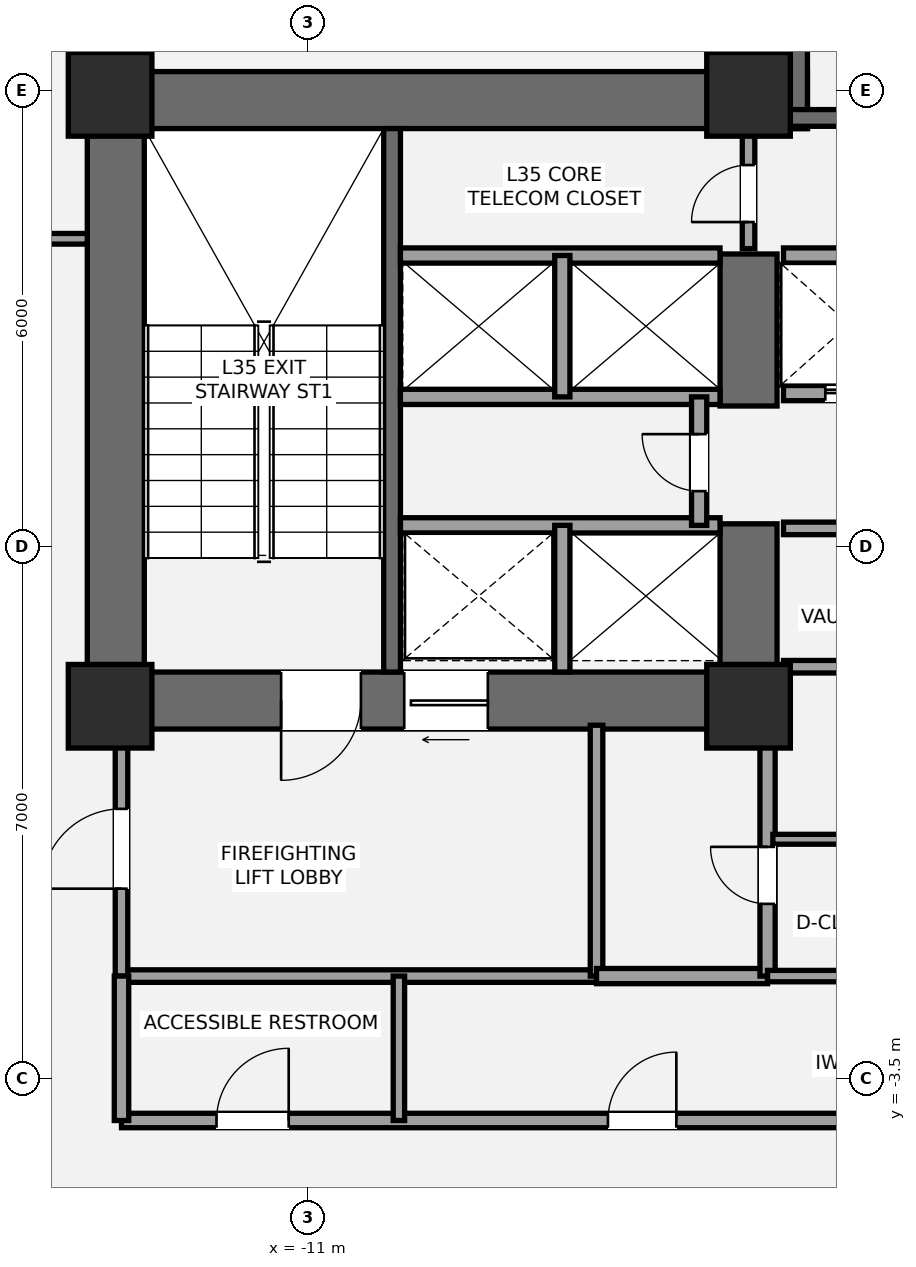
"""IFC4 building model, lengths in metres.
Left out: names, types, materials, properties, quantities, classifications, styles, units other than length and angle.
Written with IfcOpenShell. Run it as: python <this file> out.ifc"""

import sys

from ifc_helpers import new_model, si_unit, direction, frame, frame_2d, origin, origin_2d, place, context, subcontext, project, spatial, rectangle, extrude, element, fill, save


model = new_model("IFC4")
c1 = context("Model", 3, precision=1e-05, world=origin(), true_north=direction((0.0, 1.0)))
c2 = subcontext(c1, "Body", "Model", "MODEL_VIEW")
j1 = project(units=[si_unit("LENGTHUNIT", "METRE"), si_unit("PLANEANGLEUNIT", "RADIAN")], contexts=[c1])
p1 = place(None, origin())
s1 = spatial("IfcSite", under=j1, at=p1, CompositionType="ELEMENT")
p2 = place(p1, origin())
s2 = spatial("IfcBuilding", under=s1, at=p2, CompositionType="ELEMENT")
p3 = place(p2, frame((0.0, 0.0, 131.6)))
s3 = spatial("IfcBuildingStorey", under=s2, at=p3, CompositionType="ELEMENT", Elevation=131.6)
p4 = place(p3, frame((-13.525, 1.1, 0.0), z_axis=(0.0, 0.0, 1.0), x_axis=(0.0, 1.0, 0.0)))
e1 = element("IfcWall", 1, at=p4, inside=s3, PredefinedType="SHEAR", context=c2, shape_type="SweptSolid", body=[
    extrude(rectangle(XDim=8.65, YDim=0.75, at=frame_2d((4.325, 0.0))), origin(), (0.0, 0.0, 1.0), 3.5),
])
p5 = place(p3, frame((-13.9, 9.375, 0.0), z_axis=(0.0, 0.0, 1.0), x_axis=(1.0, 0.0, 0.0)))
e2 = element("IfcWall", 2, at=p5, inside=s3, PredefinedType="SHEAR", context=c2, shape_type="SweptSolid", body=[
    extrude(rectangle(XDim=9.475, YDim=0.75, at=frame_2d((4.737, 0.0))), origin(), (0.0, 0.0, 1.0), 3.5),
])
p6 = place(p3, frame((-4.825, 1.475, 0.0), z_axis=(0.0, 0.0, 1.0), x_axis=(-1.0, 0.0, 0.0)))
e3 = element("IfcWall", 3, at=p6, inside=s3, PredefinedType="SHEAR", context=c2, shape_type="SweptSolid", body=[
    extrude(rectangle(XDim=9.075, YDim=0.75, at=frame_2d((4.538, 0.0))), origin(), (0.0, 0.0, 1.0), 3.5),
])
p7 = place(p6, frame((5.475, 0.0, 0.0)))
e4 = element("IfcOpeningElement", 4, at=p7, cuts=e3, PredefinedType="OPENING", context=c2, shape_type="SweptSolid", body=[
    extrude(rectangle(XDim=1.05, YDim=2.15, at=frame_2d((0.525, 1.075))), frame((0.0, 0.385, 0.0), z_axis=(0.0, -1.0, 0.0), x_axis=(1.0, 0.0, 0.0)), (0.0, 0.0, 1.0), 0.77),
])
p8 = place(p6, frame((3.805, 0.0, 0.0)))
e5 = element("IfcOpeningElement", 5, at=p8, cuts=e3, PredefinedType="OPENING", context=c2, shape_type="SweptSolid", body=[
    extrude(rectangle(XDim=1.1, YDim=2.2, at=frame_2d((0.55, 1.1))), frame((0.0, 0.385, 0.0), z_axis=(0.0, -1.0, 0.0), x_axis=(1.0, 0.0, 0.0)), (0.0, 0.0, 1.0), 0.77),
])
p9 = place(p3, frame((-5.2, 1.1, 0.0), z_axis=(0.0, 0.0, 1.0), x_axis=(0.0, 1.0, 0.0)))
e6 = element("IfcWall", 6, at=p9, inside=s3, PredefinedType="SHEAR", context=c2, shape_type="SweptSolid", body=[
    extrude(rectangle(XDim=2.7, YDim=0.75, at=frame_2d((1.35, 0.0))), origin(), (0.0, 0.0, 1.0), 3.5),
])
p10 = place(p3, frame((-5.2, 5.35, 0.0), z_axis=(0.0, 0.0, 1.0), x_axis=(0.0, 1.0, 0.0)))
e7 = element("IfcWall", 7, at=p10, inside=s3, PredefinedType="SHEAR", context=c2, shape_type="SweptSolid", body=[
    extrude(rectangle(XDim=2.0, YDim=0.75, at=frame_2d((1.0, 0.0))), origin(), (0.0, 0.0, 1.0), 3.5),
])
p11 = place(p3, frame((-9.89, 1.85, 0.0), z_axis=(0.0, 0.0, 1.0), x_axis=(0.0, 1.0, 0.0)))
e8 = element("IfcWall", 8, at=p11, inside=s3, PredefinedType="SHEAR", context=c2, shape_type="SweptSolid", body=[
    extrude(rectangle(XDim=7.15, YDim=0.22, at=frame_2d((3.575, 0.0))), origin(), (0.0, 0.0, 1.0), 3.5),
])
p12 = place(p3, frame((-4.8, 9.0, 0.0), z_axis=(0.0, 0.0, 1.0), x_axis=(0.0, 1.0, 0.0)))
e9 = element("IfcWall", 9, at=p12, inside=s3, PredefinedType="SHEAR", context=c2, shape_type="SweptSolid", body=[
    extrude(rectangle(XDim=4.15, YDim=0.75, at=frame_2d((2.075, 0.0))), origin(), (0.0, 0.0, 1.0), 3.5),
])
p13 = place(p3, frame((-4.7, 9.14, 0.0), z_axis=(0.0, 0.0, 1.0), x_axis=(1.0, 0.0, 0.0)))
e10 = element("IfcWall", 10, at=p13, inside=s3, PredefinedType="SHEAR", context=c2, shape_type="SweptSolid", body=[
    extrude(rectangle(XDim=9.3, YDim=0.22, at=frame_2d((4.65, 0.0))), origin(), (0.0, 0.0, 1.0), 3.5),
])
p14 = place(p13, frame((1.15, 0.0, 0.0)))
e11 = element("IfcOpeningElement", 11, at=p14, cuts=e10, PredefinedType="OPENING", context=c2, shape_type="SweptSolid", body=[
    extrude(rectangle(XDim=1.05, YDim=2.15, at=frame_2d((0.525, 1.075))), frame((0.0, 0.12, 0.0), z_axis=(0.0, -1.0, 0.0), x_axis=(1.0, 0.0, 0.0)), (0.0, 0.0, 1.0), 0.24),
])
for number, where, z_axis, x_axis in (
    (12, (-13.6, 1.4, 0.0), (0.0, 0.0, 1.0), (1.0, 0.0, 0.0)),
    (13, (-13.6, 9.45, 0.0), (0.0, 0.0, 1.0), (1.0, 0.0, 0.0)),
    (14, (-5.2, 1.4, 0.0), (0.0, 0.0, 1.0), (1.0, 0.0, 0.0)),
    (15, (-5.2, 9.45, 0.0), (0.0, 0.0, 1.0), (1.0, 0.0, 0.0)),
):
    element("IfcColumn", number, at=place(p3, frame(where, z_axis=z_axis, x_axis=x_axis)), inside=s3, PredefinedType="COLUMN", context=c2, shape_type="SweptSolid", body=[
        extrude(rectangle(XDim=1.1, YDim=1.1, at=origin_2d()), origin(), (0.0, 0.0, 1.0), 3.5),
    ])
p15 = place(p3, frame((-13.45, -2.15, 0.0), z_axis=(0.0, 0.0, 1.0), x_axis=(1.0, 0.0, 0.0)))
e16 = element("IfcWall", 16, at=p15, inside=s3, PredefinedType="PARTITIONING", context=c2, shape_type="SweptSolid", body=[
    extrude(rectangle(XDim=6.25, YDim=0.165, at=frame_2d((3.125, 0.0))), origin(), (0.0, 0.0, 1.0), 3.26),
])
p16 = place(p3, frame((-13.45, -2.15, 0.0), z_axis=(0.0, 0.0, 1.0), x_axis=(0.0, 1.0, 0.0)))
e17 = element("IfcWall", 17, at=p16, inside=s3, PredefinedType="PARTITIONING", context=c2, shape_type="SweptSolid", body=[
    extrude(rectangle(XDim=3.3, YDim=0.165, at=frame_2d((1.65, 0.0))), origin(), (0.0, 0.0, 1.0), 2.713),
])
p17 = place(p16, frame((1.15, 0.0, 0.0)))
e18 = element("IfcOpeningElement", 18, at=p17, cuts=e17, PredefinedType="OPENING", context=c2, shape_type="SweptSolid", body=[
    extrude(rectangle(XDim=1.05, YDim=2.15, at=frame_2d((0.525, 1.075))), frame((0.0, 0.093, 0.0), z_axis=(0.0, -1.0, 0.0), x_axis=(1.0, 0.0, 0.0)), (0.0, 0.0, 1.0), 0.185),
])
p18 = place(p3, frame((-7.2, -2.15, 0.0), z_axis=(0.0, 0.0, 1.0), x_axis=(0.0, 1.0, 0.0)))
e19 = element("IfcWall", 19, at=p18, inside=s3, PredefinedType="PARTITIONING", context=c2, shape_type="SweptSolid", body=[
    extrude(rectangle(XDim=3.3, YDim=0.165, at=frame_2d((1.65, 0.0))), origin(), (0.0, 0.0, 1.0), 2.713),
])
p19 = place(p3, frame((-7.2, -2.15, 0.0), z_axis=(0.0, 0.0, 1.0), x_axis=(1.0, 0.0, 0.0)))
e20 = element("IfcWall", 20, at=p19, inside=s3, PredefinedType="SOLIDWALL", context=c2, shape_type="SweptSolid", body=[
    extrude(rectangle(XDim=2.25, YDim=0.2, at=frame_2d((1.125, 0.0))), origin(), (0.0, 0.0, 1.0), 3.26),
])
p20 = place(p3, frame((-4.95, -2.15, 0.0), z_axis=(0.0, 0.0, 1.0), x_axis=(0.0, 1.0, 0.0)))
e21 = element("IfcWall", 21, at=p20, inside=s3, PredefinedType="SOLIDWALL", context=c2, shape_type="SweptSolid", body=[
    extrude(rectangle(XDim=3.3, YDim=0.2, at=frame_2d((1.65, 0.0))), origin(), (0.0, 0.0, 1.0), 2.713),
])
p21 = place(p20, frame((0.95, 0.0, 0.0)))
e22 = element("IfcOpeningElement", 22, at=p21, cuts=e21, PredefinedType="OPENING", context=c2, shape_type="SweptSolid", body=[
    extrude(rectangle(XDim=0.75, YDim=2.1, at=frame_2d((0.375, 1.05))), frame((0.0, 0.11, 0.0), z_axis=(0.0, -1.0, 0.0), x_axis=(1.0, 0.0, 0.0)), (0.0, 0.0, 1.0), 0.22),
])
p22 = place(p3, frame((-4.88, -0.35, 0.0), z_axis=(0.0, 0.0, 1.0), x_axis=(1.0, 0.0, 0.0)))
e23 = element("IfcWall", 23, at=p22, inside=s3, PredefinedType="PARTITIONING", context=c2, shape_type="SweptSolid", body=[
    extrude(rectangle(XDim=2.73, YDim=0.13, at=frame_2d((1.365, 0.0))), origin(), (0.0, 0.0, 1.0), 3.26),
])
p23 = place(p22, frame((0.85, 0.0, 0.0)))
e24 = element("IfcOpeningElement", 24, at=p23, cuts=e23, PredefinedType="OPENING", context=c2, shape_type="SweptSolid", body=[
    extrude(rectangle(XDim=0.78, YDim=2.1, at=frame_2d((0.39, 1.05))), frame((0.0, 0.075, 0.0), z_axis=(0.0, -1.0, 0.0), x_axis=(1.0, 0.0, 0.0)), (0.0, 0.0, 1.0), 0.15),
])
p24 = place(p3, frame((-9.78, 3.78, 0.0), z_axis=(0.0, 0.0, 1.0), x_axis=(1.0, 0.0, 0.0)))
e25 = element("IfcWall", 25, at=p24, inside=s3, PredefinedType="SOLIDWALL", context=c2, shape_type="SweptSolid", body=[
    extrude(rectangle(XDim=4.205, YDim=0.2, at=frame_2d((2.103, 0.0))), origin(), (0.0, 0.0, 1.0), 3.26),
])
p25 = place(p3, frame((-7.65, 1.85, 0.0), z_axis=(0.0, 0.0, 1.0), x_axis=(0.0, 1.0, 0.0)))
e26 = element("IfcWall", 26, at=p25, inside=s3, PredefinedType="SOLIDWALL", context=c2, shape_type="SweptSolid", body=[
    extrude(rectangle(XDim=1.93, YDim=0.2, at=frame_2d((0.965, 0.0))), origin(), (0.0, 0.0, 1.0), 3.26),
])
for number, where, z_axis, x_axis in (
    (27, (-9.78, 5.47, 0.0), (0.0, 0.0, 1.0), (1.0, 0.0, 0.0)),
    (28, (-9.78, 7.33, 0.0), (0.0, 0.0, 1.0), (1.0, 0.0, 0.0)),
):
    element("IfcWall", number, at=place(p3, frame(where, z_axis=z_axis, x_axis=x_axis)), inside=s3, PredefinedType="SOLIDWALL", context=c2, shape_type="SweptSolid", body=[
        extrude(rectangle(XDim=4.205, YDim=0.2, at=frame_2d((2.103, 0.0))), origin(), (0.0, 0.0, 1.0), 3.26),
    ])
p26 = place(p3, frame((-7.65, 5.47, 0.0), z_axis=(0.0, 0.0, 1.0), x_axis=(0.0, 1.0, 0.0)))
e29 = element("IfcWall", 29, at=p26, inside=s3, PredefinedType="SOLIDWALL", context=c2, shape_type="SweptSolid", body=[
    extrude(rectangle(XDim=1.86, YDim=0.2, at=frame_2d((0.93, 0.0))), origin(), (0.0, 0.0, 1.0), 3.26),
])
p27 = place(p3, frame((-5.85, 3.78, 0.0), z_axis=(0.0, 0.0, 1.0), x_axis=(0.0, 1.0, 0.0)))
e30 = element("IfcWall", 30, at=p27, inside=s3, PredefinedType="SOLIDWALL", context=c2, shape_type="SweptSolid", body=[
    extrude(rectangle(XDim=1.69, YDim=0.2, at=frame_2d((0.845, 0.0))), origin(), (0.0, 0.0, 1.0), 3.26),
])
p28 = place(p27, frame((0.45, 0.0, 0.0)))
e31 = element("IfcOpeningElement", 31, at=p28, cuts=e30, PredefinedType="OPENING", context=c2, shape_type="SweptSolid", body=[
    extrude(rectangle(XDim=0.75, YDim=2.1, at=frame_2d((0.375, 1.05))), frame((0.0, 0.11, 0.0), z_axis=(0.0, -1.0, 0.0), x_axis=(1.0, 0.0, 0.0)), (0.0, 0.0, 1.0), 0.22),
])
p29 = place(p3, frame((-4.74, 1.92, 0.0), z_axis=(0.0, 0.0, 1.0), x_axis=(1.0, 0.0, 0.0)))
e32 = element("IfcWall", 32, at=p29, inside=s3, PredefinedType="PARTITIONING", context=c2, shape_type="SweptSolid", body=[
    extrude(rectangle(XDim=3.89, YDim=0.165, at=frame_2d((1.945, 0.0))), origin(), (0.0, 0.0, 1.0), 2.25),
])
p30 = place(p3, frame((-4.74, 3.74, 0.0), z_axis=(0.0, 0.0, 1.0), x_axis=(1.0, 0.0, 0.0)))
e33 = element("IfcWall", 33, at=p30, inside=s3, PredefinedType="PARTITIONING", context=c2, shape_type="SweptSolid", body=[
    extrude(rectangle(XDim=3.89, YDim=0.165, at=frame_2d((1.945, 0.0))), origin(), (0.0, 0.0, 1.0), 3.26),
])
p31 = place(p30, frame((1.6, 0.0, 0.0)))
e34 = element("IfcOpeningElement", 34, at=p31, cuts=e33, PredefinedType="OPENING", context=c2, shape_type="SweptSolid", body=[
    extrude(rectangle(XDim=0.85, YDim=2.1, at=frame_2d((0.425, 1.05))), frame((0.0, 0.093, 0.0), z_axis=(0.0, -1.0, 0.0), x_axis=(1.0, 0.0, 0.0)), (0.0, 0.0, 1.0), 0.185),
])
p32 = place(p3, frame((-4.74, 5.52, 0.0), z_axis=(0.0, 0.0, 1.0), x_axis=(1.0, 0.0, 0.0)))
e35 = element("IfcWall", 35, at=p32, inside=s3, PredefinedType="SOLIDWALL", context=c2, shape_type="SweptSolid", body=[
    extrude(rectangle(XDim=3.86, YDim=0.2, at=frame_2d((1.93, 0.0))), origin(), (0.0, 0.0, 1.0), 3.26),
])
p33 = place(p32, frame((0.55, 0.0, 0.0)))
e36 = element("IfcOpeningElement", 36, at=p33, cuts=e35, PredefinedType="OPENING", context=c2, shape_type="SweptSolid", body=[
    extrude(rectangle(XDim=1.1, YDim=2.2, at=frame_2d((0.55, 1.1))), frame((0.0, 0.11, 0.0), z_axis=(0.0, -1.0, 0.0), x_axis=(1.0, 0.0, 0.0)), (0.0, 0.0, 1.0), 0.22),
])
p34 = place(p32, frame((2.3, 0.0, 0.0)))
e37 = element("IfcOpeningElement", 37, at=p34, cuts=e35, PredefinedType="OPENING", context=c2, shape_type="SweptSolid", body=[
    extrude(rectangle(XDim=1.1, YDim=2.2, at=frame_2d((0.55, 1.1))), frame((0.0, 0.11, 0.0), z_axis=(0.0, -1.0, 0.0), x_axis=(1.0, 0.0, 0.0)), (0.0, 0.0, 1.0), 0.22),
])
p35 = place(p3, frame((-4.74, 7.33, 0.0), z_axis=(0.0, 0.0, 1.0), x_axis=(1.0, 0.0, 0.0)))
e38 = element("IfcWall", 38, at=p35, inside=s3, PredefinedType="SOLIDWALL", context=c2, shape_type="SweptSolid", body=[
    extrude(rectangle(XDim=3.86, YDim=0.2, at=frame_2d((1.93, 0.0))), origin(), (0.0, 0.0, 1.0), 3.26),
])
p36 = place(p3, frame((-5.2, 7.42, 0.0), z_axis=(0.0, 0.0, 1.0), x_axis=(0.0, 1.0, 0.0)))
e39 = element("IfcWall", 39, at=p36, inside=s3, PredefinedType="PARTITIONING", context=c2, shape_type="SweptSolid", body=[
    extrude(rectangle(XDim=1.58, YDim=0.165, at=frame_2d((0.79, 0.0))), origin(), (0.0, 0.0, 1.0), 3.26),
])
p37 = place(p36, frame((0.35, 0.0, 0.0)))
e40 = element("IfcOpeningElement", 40, at=p37, cuts=e39, PredefinedType="OPENING", context=c2, shape_type="SweptSolid", body=[
    extrude(rectangle(XDim=0.75, YDim=2.1, at=frame_2d((0.375, 1.05))), frame((0.0, 0.093, 0.0), z_axis=(0.0, -1.0, 0.0), x_axis=(1.0, 0.0, 0.0)), (0.0, 0.0, 1.0), 0.185),
])
p38 = place(p3, frame((-13.45, -4.05, 0.0), z_axis=(0.0, 0.0, 1.0), x_axis=(1.0, 0.0, 0.0)))
e41 = element("IfcWall", 41, at=p38, inside=s3, PredefinedType="PLUMBINGWALL", context=c2, shape_type="SweptSolid", body=[
    extrude(rectangle(XDim=11.35, YDim=0.19, at=frame_2d((5.675, 0.0))), origin(), (0.0, 0.0, 1.0), 2.713),
])
p39 = place(p38, frame((1.25, 0.0, 0.0)))
e42 = element("IfcOpeningElement", 42, at=p39, cuts=e41, PredefinedType="OPENING", context=c2, shape_type="SweptSolid", body=[
    extrude(rectangle(XDim=0.95, YDim=2.15, at=frame_2d((0.475, 1.075))), frame((0.0, 0.105, 0.0), z_axis=(0.0, -1.0, 0.0), x_axis=(1.0, 0.0, 0.0)), (0.0, 0.0, 1.0), 0.21),
])
p40 = place(p38, frame((6.4, 0.0, 0.0)))
e43 = element("IfcOpeningElement", 43, at=p40, cuts=e41, PredefinedType="OPENING", context=c2, shape_type="SweptSolid", body=[
    extrude(rectangle(XDim=0.9, YDim=2.1, at=frame_2d((0.45, 1.05))), frame((0.0, 0.105, 0.0), z_axis=(0.0, -1.0, 0.0), x_axis=(1.0, 0.0, 0.0)), (0.0, 0.0, 1.0), 0.21),
])
p41 = place(p3, frame((-4.95, -2.15, 0.0), z_axis=(0.0, 0.0, 1.0), x_axis=(1.0, 0.0, 0.0)))
e44 = element("IfcWall", 44, at=p41, inside=s3, PredefinedType="PLUMBINGWALL", context=c2, shape_type="SweptSolid", body=[
    extrude(rectangle(XDim=2.85, YDim=0.15, at=frame_2d((1.425, 0.0))), origin(), (0.0, 0.0, 1.0), 2.713),
])
p42 = place(p3, frame((-13.45, -4.05, 0.0), z_axis=(0.0, 0.0, 1.0), x_axis=(0.0, 1.0, 0.0)))
e45 = element("IfcWall", 45, at=p42, inside=s3, PredefinedType="PLUMBINGWALL", context=c2, shape_type="SweptSolid", body=[
    extrude(rectangle(XDim=1.9, YDim=0.19, at=frame_2d((0.95, 0.0))), origin(), (0.0, 0.0, 1.0), 2.713),
])
p43 = place(p3, frame((-9.8, -4.05, 0.0), z_axis=(0.0, 0.0, 1.0), x_axis=(0.0, 1.0, 0.0)))
e46 = element("IfcWall", 46, at=p43, inside=s3, PredefinedType="PLUMBINGWALL", context=c2, shape_type="SweptSolid", body=[
    extrude(rectangle(XDim=1.9, YDim=0.15, at=frame_2d((0.95, 0.0))), origin(), (0.0, 0.0, 1.0), 3.26),
])
p44 = place(p3, frame((-15.7, 7.55, 0.0), z_axis=(0.0, 0.0, 1.0), x_axis=(1.0, 0.0, 0.0)))
e47 = element("IfcWall", 47, at=p44, inside=s3, PredefinedType="PARTITIONING", context=c2, shape_type="SweptSolid", body=[
    extrude(rectangle(XDim=1.8, YDim=0.14, at=frame_2d((0.9, 0.0))), origin(), (0.0, 0.0, 1.0), 3.26),
])
p45 = place(p44, frame((0.32, 0.0, 0.0)))
e48 = element("IfcOpeningElement", 48, at=p45, cuts=e47, PredefinedType="OPENING", context=c2, shape_type="SweptSolid", body=[
    extrude(rectangle(XDim=0.92, YDim=2.15, at=frame_2d((0.46, 1.075))), frame((0.0, 0.08, 0.0), z_axis=(0.0, -1.0, 0.0), x_axis=(1.0, 0.0, 0.0)), (0.0, 0.0, 1.0), 0.16),
])
p46 = place(p7, origin())
e49 = element("IfcDoor", 49, at=p46, inside=s3, OperationType="SINGLE_SWING_RIGHT", PredefinedType="DOOR", context=c2, shape_type="SweptSolid", body=[
    extrude(rectangle(XDim=1.05, YDim=2.15, at=frame_2d((0.525, 1.075))), frame((0.0, 0.025, 0.0), z_axis=(0.0, -1.0, 0.0), x_axis=(1.0, 0.0, 0.0)), (0.0, 0.0, 1.0), 0.05),
])
fill(e4, e49)
p47 = place(p17, origin())
e50 = element("IfcDoor", 50, at=p47, inside=s3, OperationType="SINGLE_SWING_LEFT", PredefinedType="DOOR", context=c2, shape_type="SweptSolid", body=[
    extrude(rectangle(XDim=1.05, YDim=2.15, at=frame_2d((0.525, 1.075))), frame((0.0, 0.025, 0.0), z_axis=(0.0, -1.0, 0.0), x_axis=(1.0, 0.0, 0.0)), (0.0, 0.0, 1.0), 0.05),
])
fill(e18, e50)
p48 = place(p21, origin())
e51 = element("IfcDoor", 51, at=p48, inside=s3, OperationType="SINGLE_SWING_RIGHT", PredefinedType="DOOR", context=c2, shape_type="SweptSolid", body=[
    extrude(rectangle(XDim=0.75, YDim=2.1, at=frame_2d((0.375, 1.05))), frame((0.0, 0.025, 0.0), z_axis=(0.0, -1.0, 0.0), x_axis=(1.0, 0.0, 0.0)), (0.0, 0.0, 1.0), 0.05),
])
fill(e22, e51)
p49 = place(p8, origin())
e52 = element("IfcDoor", 52, at=p49, inside=s3, OperationType="SLIDING_TO_LEFT", PredefinedType="DOOR", context=c2, shape_type="SweptSolid", body=[
    extrude(rectangle(XDim=1.1, YDim=2.2, at=frame_2d((0.55, 1.1))), frame((0.0, 0.025, 0.0), z_axis=(0.0, -1.0, 0.0), x_axis=(1.0, 0.0, 0.0)), (0.0, 0.0, 1.0), 0.05),
])
fill(e5, e52)
p50 = place(p28, origin())
e53 = element("IfcDoor", 53, at=p50, inside=s3, OperationType="SINGLE_SWING_RIGHT", PredefinedType="DOOR", context=c2, shape_type="SweptSolid", body=[
    extrude(rectangle(XDim=0.75, YDim=2.1, at=frame_2d((0.375, 1.05))), frame((0.0, 0.025, 0.0), z_axis=(0.0, -1.0, 0.0), x_axis=(1.0, 0.0, 0.0)), (0.0, 0.0, 1.0), 0.05),
])
fill(e31, e53)
p51 = place(p33, origin())
e54 = element("IfcDoor", 54, at=p51, inside=s3, OperationType="SLIDING_TO_LEFT", PredefinedType="DOOR", context=c2, shape_type="SweptSolid", body=[
    extrude(rectangle(XDim=1.1, YDim=2.2, at=frame_2d((0.55, 1.1))), frame((0.0, 0.025, 0.0), z_axis=(0.0, -1.0, 0.0), x_axis=(1.0, 0.0, 0.0)), (0.0, 0.0, 1.0), 0.05),
])
fill(e36, e54)
p52 = place(p37, origin())
e55 = element("IfcDoor", 55, at=p52, inside=s3, OperationType="SINGLE_SWING_LEFT", PredefinedType="DOOR", context=c2, shape_type="SweptSolid", body=[
    extrude(rectangle(XDim=0.75, YDim=2.1, at=frame_2d((0.375, 1.05))), frame((0.0, 0.025, 0.0), z_axis=(0.0, -1.0, 0.0), x_axis=(1.0, 0.0, 0.0)), (0.0, 0.0, 1.0), 0.05),
])
fill(e40, e55)
p53 = place(p39, origin())
e56 = element("IfcDoor", 56, at=p53, inside=s3, OperationType="SINGLE_SWING_RIGHT", PredefinedType="DOOR", context=c2, shape_type="SweptSolid", body=[
    extrude(rectangle(XDim=0.95, YDim=2.15, at=frame_2d((0.475, 1.075))), frame((0.0, 0.025, 0.0), z_axis=(0.0, -1.0, 0.0), x_axis=(1.0, 0.0, 0.0)), (0.0, 0.0, 1.0), 0.05),
])
fill(e42, e56)
p54 = place(p40, origin())
e57 = element("IfcDoor", 57, at=p54, inside=s3, OperationType="SINGLE_SWING_RIGHT", PredefinedType="DOOR", context=c2, shape_type="SweptSolid", body=[
    extrude(rectangle(XDim=0.9, YDim=2.1, at=frame_2d((0.45, 1.05))), frame((0.0, 0.025, 0.0), z_axis=(0.0, -1.0, 0.0), x_axis=(1.0, 0.0, 0.0)), (0.0, 0.0, 1.0), 0.05),
])
fill(e43, e57)
save(model, sys.argv[1])
